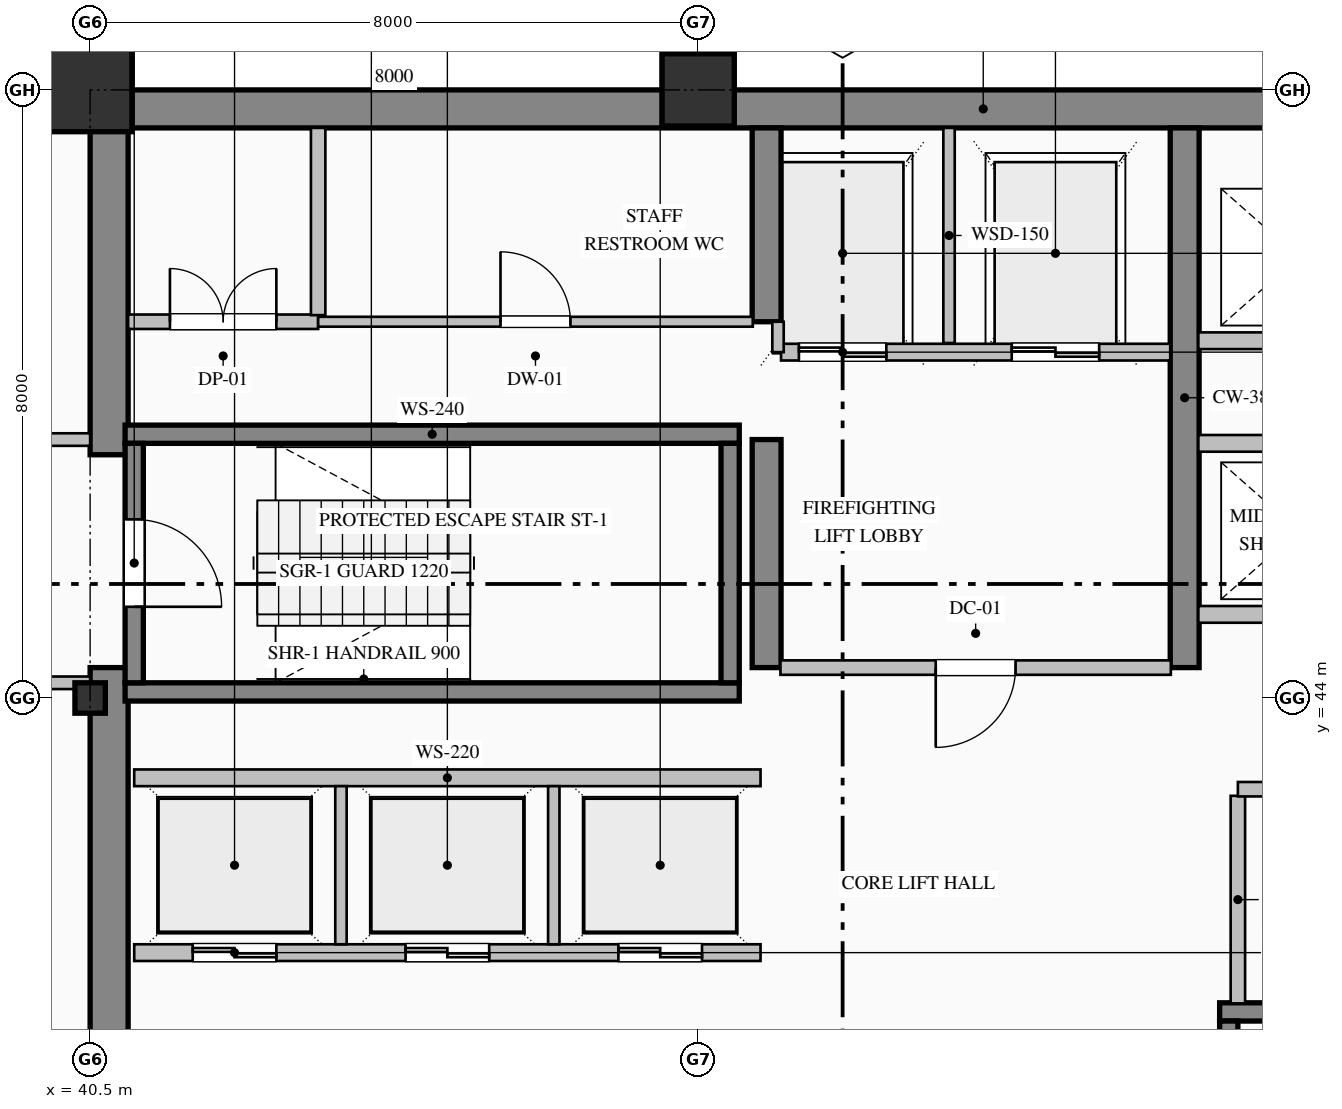
"""IFC4 building model, lengths in metres.
Left out: names, types, materials, properties, quantities, classifications, styles, units other than length and angle.
Written with IfcOpenShell. Run it as: python <this file> out.ifc"""

import sys

from ifc_helpers import new_model, si_unit, direction, frame, frame_2d, origin, origin_2d, place, context, subcontext, project, spatial, rectangle, hollow_rectangle, i_section, extrude, element, fill, save


model = new_model("IFC4")
c1 = context("Model", 3, precision=1e-05, world=origin(), true_north=direction((0.0, 1.0)))
c2 = subcontext(c1, "Body", "Model", "MODEL_VIEW")
j1 = project(units=[si_unit("LENGTHUNIT", "METRE"), si_unit("PLANEANGLEUNIT", "RADIAN")], contexts=[c1])
p1 = place(None, origin())
s1 = spatial("IfcSite", under=j1, at=p1, CompositionType="ELEMENT")
p2 = place(p1, origin())
s2 = spatial("IfcBuilding", under=s1, at=p2, CompositionType="ELEMENT")
p3 = place(p2, frame((0.0, 0.0, 163.0)))
s3 = spatial("IfcBuildingStorey", under=s2, at=p3, CompositionType="ELEMENT", Elevation=163.0)
p4 = place(p3, frame((40.5, 51.75, 0.0), z_axis=(0.0, 0.0, 1.0), x_axis=(1.0, 0.0, 0.0)))
e1 = element("IfcWall", 1, at=p4, inside=s3, PredefinedType="SHEAR", context=c2, shape_type="SweptSolid", body=[
    extrude(rectangle(XDim=23.5, YDim=0.5, at=frame_2d((11.75, 0.0))), origin(), (0.0, 0.0, 1.0), 3.765),
])
p5 = place(p3, frame((40.75, 36.5, 0.0), z_axis=(0.0, 0.0, 1.0), x_axis=(0.0, 1.0, 0.0)))
e2 = element("IfcWall", 2, at=p5, inside=s3, PredefinedType="SHEAR", context=c2, shape_type="SweptSolid", body=[
    extrude(rectangle(XDim=7.9, YDim=0.5, at=frame_2d((3.95, 0.0))), origin(), (0.0, 0.0, 1.0), 3.765),
])
p6 = place(p3, frame((40.75, 47.2, 0.0), z_axis=(0.0, 0.0, 1.0), x_axis=(0.0, 1.0, 0.0)))
e3 = element("IfcWall", 3, at=p6, inside=s3, PredefinedType="SHEAR", context=c2, shape_type="SweptSolid", body=[
    extrude(rectangle(XDim=4.3, YDim=0.5, at=frame_2d((2.15, 0.0))), origin(), (0.0, 0.0, 1.0), 3.765),
])
p7 = place(p3, frame((49.4, 44.4, 0.0), z_axis=(0.0, 0.0, 1.0), x_axis=(0.0, 1.0, 0.0)))
e4 = element("IfcWall", 4, at=p7, inside=s3, PredefinedType="SHEAR", context=c2, shape_type="SweptSolid", body=[
    extrude(rectangle(XDim=3.0, YDim=0.38, at=frame_2d((1.5, 0.0))), origin(), (0.0, 0.0, 1.0), 3.765),
])
p8 = place(p3, frame((49.4, 48.95, 0.0), z_axis=(0.0, 0.0, 1.0), x_axis=(0.0, 1.0, 0.0)))
e5 = element("IfcWall", 5, at=p8, inside=s3, PredefinedType="SHEAR", context=c2, shape_type="SweptSolid", body=[
    extrude(rectangle(XDim=2.55, YDim=0.38, at=frame_2d((1.275, 0.0))), origin(), (0.0, 0.0, 1.0), 3.765),
])
p9 = place(p3, frame((54.9, 44.4, 0.0), z_axis=(0.0, 0.0, 1.0), x_axis=(0.0, 1.0, 0.0)))
e6 = element("IfcWall", 6, at=p9, inside=s3, PredefinedType="SHEAR", context=c2, shape_type="SweptSolid", body=[
    extrude(rectangle(XDim=7.1, YDim=0.38, at=frame_2d((3.55, 0.0))), origin(), (0.0, 0.0, 1.0), 3.765),
])
p10 = place(p3, frame((40.5, 44.0, 0.0), z_axis=(0.0, 0.0, 1.0), x_axis=(1.0, 0.0, 0.0)))
e7 = element("IfcColumn", 7, at=p10, inside=s3, PredefinedType="COLUMN", context=c2, shape_type="SweptSolid", body=[
    extrude(i_section(OverallWidth=0.4, OverallDepth=0.4, WebThickness=0.013, FlangeThickness=0.021, FilletRadius=0.022, at=origin_2d()), origin(), (0.0, 0.0, 1.0), 4.0),
])
p11 = place(p3, frame((40.5, 52.0, 0.0), z_axis=(0.0, 0.0, 1.0), x_axis=(1.0, 0.0, 0.0)))
e8 = element("IfcColumn", 8, at=p11, inside=s3, PredefinedType="COLUMN", context=c2, shape_type="SweptSolid", body=[
    extrude(hollow_rectangle(XDim=1.1, YDim=1.1, WallThickness=0.04, at=origin_2d()), origin(), (0.0, 0.0, 1.0), 4.0),
])
p12 = place(p3, frame((48.5, 52.0, 0.0), z_axis=(0.0, 0.0, 1.0), x_axis=(1.0, 0.0, 0.0)))
e9 = element("IfcColumn", 9, at=p12, inside=s3, PredefinedType="COLUMN", context=c2, shape_type="SweptSolid", body=[
    extrude(hollow_rectangle(XDim=0.95, YDim=0.95, WallThickness=0.036, at=origin_2d()), origin(), (0.0, 0.0, 1.0), 4.0),
])
p13 = place(p3, frame((13.0, 51.82, 0.0), z_axis=(0.0, 0.0, 1.0), x_axis=(1.0, 0.0, 0.0)))
e10 = element("IfcWall", 10, at=p13, inside=s3, PredefinedType="SOLIDWALL", context=c2, shape_type="SweptSolid", body=[
    extrude(rectangle(XDim=27.52, YDim=0.36, at=frame_2d((13.76, 0.0))), origin(), (0.0, 0.0, 1.0), 3.265),
])
p14 = place(p13, frame((6.45, 0.0, 0.85)))
e11 = element("IfcOpeningElement", 11, at=p14, cuts=e10, PredefinedType="OPENING", context=c2, shape_type="SweptSolid", body=[
    extrude(rectangle(XDim=1.5, YDim=1.95, at=frame_2d((0.75, 0.975))), frame((0.0, 0.19, 0.0), z_axis=(0.0, -1.0, 0.0), x_axis=(1.0, 0.0, 0.0)), (0.0, 0.0, 1.0), 0.38),
])
p15 = place(p13, frame((13.8, 0.0, 0.7)))
e12 = element("IfcOpeningElement", 12, at=p15, cuts=e10, PredefinedType="OPENING", context=c2, shape_type="SweptSolid", body=[
    extrude(rectangle(XDim=1.2, YDim=1.85, at=frame_2d((0.6, 0.925))), frame((0.0, 0.19, 0.0), z_axis=(0.0, -1.0, 0.0), x_axis=(1.0, 0.0, 0.0)), (0.0, 0.0, 1.0), 0.38),
])
for number, where, z_axis, x_axis in (
    (13, (40.96, 47.47, 0.0), (0.0, 0.0, 1.0), (1.0, 0.0, 0.0)),
    (14, (49.04, 44.08, 0.0), (0.0, 0.0, 1.0), (-1.0, 0.0, 0.0)),
):
    element("IfcWall", number, at=place(p3, frame(where, z_axis=z_axis, x_axis=x_axis)), inside=s3, PredefinedType="SOLIDWALL", context=c2, shape_type="SweptSolid", body=[
        extrude(rectangle(XDim=8.08, YDim=0.24, at=frame_2d((4.04, 0.0))), origin(), (0.0, 0.0, 1.0), 4.0),
    ])
p16 = place(p3, frame((41.08, 47.35, 0.0), z_axis=(0.0, 0.0, 1.0), x_axis=(0.0, -1.0, 0.0)))
e15 = element("IfcWall", 15, at=p16, inside=s3, PredefinedType="SOLIDWALL", context=c2, shape_type="SweptSolid", body=[
    extrude(rectangle(XDim=3.15, YDim=0.24, at=frame_2d((1.575, 0.0))), origin(), (0.0, 0.0, 1.0), 4.0),
])
p17 = place(p16, frame((1.0, 0.0, 0.0)))
e16 = element("IfcOpeningElement", 16, at=p17, cuts=e15, PredefinedType="OPENING", context=c2, shape_type="SweptSolid", body=[
    extrude(rectangle(XDim=1.15, YDim=2.2, at=frame_2d((0.575, 1.1))), frame((0.0, 0.13, 0.0), z_axis=(0.0, -1.0, 0.0), x_axis=(1.0, 0.0, 0.0)), (0.0, 0.0, 1.0), 0.26),
])
p18 = place(p3, frame((48.92, 44.2, 0.0), z_axis=(0.0, 0.0, 1.0), x_axis=(0.0, 1.0, 0.0)))
e17 = element("IfcWall", 17, at=p18, inside=s3, PredefinedType="SOLIDWALL", context=c2, shape_type="SweptSolid", body=[
    extrude(rectangle(XDim=3.15, YDim=0.24, at=frame_2d((1.575, 0.0))), origin(), (0.0, 0.0, 1.0), 4.0),
])
p19 = place(p3, frame((55.36, 39.87, 0.0), z_axis=(0.0, 0.0, 1.0), x_axis=(1.0, 0.0, 0.0)))
e18 = element("IfcWall", 18, at=p19, inside=s3, PredefinedType="SOLIDWALL", context=c2, shape_type="SweptSolid", body=[
    extrude(rectangle(XDim=8.08, YDim=0.24, at=frame_2d((4.04, 0.0))), origin(), (0.0, 0.0, 1.0), 4.0),
])
p20 = place(p3, frame((55.48, 39.75, 0.0), z_axis=(0.0, 0.0, 1.0), x_axis=(0.0, -1.0, 0.0)))
e19 = element("IfcWall", 19, at=p20, inside=s3, PredefinedType="SOLIDWALL", context=c2, shape_type="SweptSolid", body=[
    extrude(rectangle(XDim=3.15, YDim=0.24, at=frame_2d((1.575, 0.0))), origin(), (0.0, 0.0, 1.0), 4.0),
])
p21 = place(p20, frame((1.0, 0.0, 0.0)))
e20 = element("IfcOpeningElement", 20, at=p21, cuts=e19, PredefinedType="OPENING", context=c2, shape_type="SweptSolid", body=[
    extrude(rectangle(XDim=1.15, YDim=2.2, at=frame_2d((0.575, 1.1))), frame((0.0, 0.13, 0.0), z_axis=(0.0, -1.0, 0.0), x_axis=(1.0, 0.0, 0.0)), (0.0, 0.0, 1.0), 0.26),
])
p22 = place(p3, frame((54.71, 48.55, 0.0), z_axis=(0.0, 0.0, 1.0), x_axis=(-1.0, 0.0, 0.0)))
e21 = element("IfcWall", 21, at=p22, inside=s3, PredefinedType="PARTITIONING", context=c2, shape_type="SweptSolid", body=[
    extrude(rectangle(XDim=5.12, YDim=0.22, at=frame_2d((2.56, 0.0))), origin(), (0.0, 0.0, 1.0), 3.765),
])
p23 = place(p22, frame((3.735, 0.0, 0.0)))
e22 = element("IfcOpeningElement", 22, at=p23, cuts=e21, PredefinedType="OPENING", context=c2, shape_type="SweptSolid", body=[
    extrude(rectangle(XDim=1.15, YDim=2.2, at=frame_2d((0.575, 1.1))), frame((0.0, 0.12, 0.0), z_axis=(0.0, -1.0, 0.0), x_axis=(1.0, 0.0, 0.0)), (0.0, 0.0, 1.0), 0.24),
])
p24 = place(p22, frame((0.935, 0.0, 0.0)))
e23 = element("IfcOpeningElement", 23, at=p24, cuts=e21, PredefinedType="OPENING", context=c2, shape_type="SweptSolid", body=[
    extrude(rectangle(XDim=1.15, YDim=2.2, at=frame_2d((0.575, 1.1))), frame((0.0, 0.12, 0.0), z_axis=(0.0, -1.0, 0.0), x_axis=(1.0, 0.0, 0.0)), (0.0, 0.0, 1.0), 0.24),
])
p25 = place(p3, frame((51.8, 48.67, 0.0), z_axis=(0.0, 0.0, 1.0), x_axis=(0.0, 1.0, 0.0)))
e24 = element("IfcWall", 24, at=p25, inside=s3, PredefinedType="PARTITIONING", context=c2, shape_type="SweptSolid", body=[
    extrude(rectangle(XDim=2.83, YDim=0.15, at=frame_2d((1.415, 0.0))), origin(), (0.0, 0.0, 1.0), 3.765),
])
p26 = place(p3, frame((49.55, 48.55, 0.0), z_axis=(0.0, 0.0, 1.0), x_axis=(0.0, 1.0, 0.0)))
e25 = element("IfcWall", 25, at=p26, inside=s3, PredefinedType="PARTITIONING", context=c2, shape_type="SweptSolid", body=[
    extrude(rectangle(XDim=0.4, YDim=0.15, at=frame_2d((0.2, 0.0))), origin(), (0.0, 0.0, 1.0), 3.765),
])
p27 = place(p3, frame((49.32, 40.65, 0.0), z_axis=(0.0, 0.0, 1.0), x_axis=(-1.0, 0.0, 0.0)))
e26 = element("IfcWall", 26, at=p27, inside=s3, PredefinedType="PARTITIONING", context=c2, shape_type="SweptSolid", body=[
    extrude(rectangle(XDim=8.24, YDim=0.22, at=frame_2d((4.12, 0.0))), origin(), (0.0, 0.0, 1.0), 3.765),
])
p28 = place(p27, frame((6.37, 0.0, 0.0)))
e27 = element("IfcOpeningElement", 27, at=p28, cuts=e26, PredefinedType="OPENING", context=c2, shape_type="SweptSolid", body=[
    extrude(rectangle(XDim=1.1, YDim=2.2, at=frame_2d((0.55, 1.1))), frame((0.0, 0.12, 0.0), z_axis=(0.0, -1.0, 0.0), x_axis=(1.0, 0.0, 0.0)), (0.0, 0.0, 1.0), 0.24),
])
p29 = place(p27, frame((3.57, 0.0, 0.0)))
e28 = element("IfcOpeningElement", 28, at=p29, cuts=e26, PredefinedType="OPENING", context=c2, shape_type="SweptSolid", body=[
    extrude(rectangle(XDim=1.1, YDim=2.2, at=frame_2d((0.55, 1.1))), frame((0.0, 0.12, 0.0), z_axis=(0.0, -1.0, 0.0), x_axis=(1.0, 0.0, 0.0)), (0.0, 0.0, 1.0), 0.24),
])
p30 = place(p27, frame((0.77, 0.0, 0.0)))
e29 = element("IfcOpeningElement", 29, at=p30, cuts=e26, PredefinedType="OPENING", context=c2, shape_type="SweptSolid", body=[
    extrude(rectangle(XDim=1.1, YDim=2.2, at=frame_2d((0.55, 1.1))), frame((0.0, 0.12, 0.0), z_axis=(0.0, -1.0, 0.0), x_axis=(1.0, 0.0, 0.0)), (0.0, 0.0, 1.0), 0.24),
])
p31 = place(p3, frame((41.08, 42.95, 0.0), z_axis=(0.0, 0.0, 1.0), x_axis=(1.0, 0.0, 0.0)))
e30 = element("IfcWall", 30, at=p31, inside=s3, PredefinedType="PARTITIONING", context=c2, shape_type="SweptSolid", body=[
    extrude(rectangle(XDim=8.24, YDim=0.22, at=frame_2d((4.12, 0.0))), origin(), (0.0, 0.0, 1.0), 3.765),
])
for number, where, z_axis, x_axis in (
    (31, (43.8, 40.76, 0.0), (0.0, 0.0, 1.0), (0.0, 1.0, 0.0)),
    (32, (46.6, 40.76, 0.0), (0.0, 0.0, 1.0), (0.0, 1.0, 0.0)),
):
    element("IfcWall", number, at=place(p3, frame(where, z_axis=z_axis, x_axis=x_axis)), inside=s3, PredefinedType="PARTITIONING", context=c2, shape_type="SweptSolid", body=[
        extrude(rectangle(XDim=2.08, YDim=0.15, at=frame_2d((1.04, 0.0))), origin(), (0.0, 0.0, 1.0), 3.765),
    ])
for number, where, z_axis, x_axis in (
    (33, (63.32, 45.1, 0.0), (0.0, 0.0, 1.0), (-1.0, 0.0, 0.0)),
    (34, (55.08, 47.35, 0.0), (0.0, 0.0, 1.0), (1.0, 0.0, 0.0)),
    (35, (63.32, 48.7, 0.0), (0.0, 0.0, 1.0), (-1.0, 0.0, 0.0)),
):
    element("IfcWall", number, at=place(p3, frame(where, z_axis=z_axis, x_axis=x_axis)), inside=s3, PredefinedType="PARTITIONING", context=c2, shape_type="SweptSolid", body=[
        extrude(rectangle(XDim=8.24, YDim=0.22, at=frame_2d((4.12, 0.0))), origin(), (0.0, 0.0, 1.0), 3.765),
    ])
p32 = place(p3, frame((37.8, 47.4, 0.0), z_axis=(0.0, 0.0, 1.0), x_axis=(1.0, 0.0, 0.0)))
e36 = element("IfcWall", 36, at=p32, inside=s3, PredefinedType="PARTITIONING", context=c2, shape_type="SweptSolid", body=[
    extrude(rectangle(XDim=2.7, YDim=0.165, at=frame_2d((1.35, 0.0))), origin(), (0.0, 0.0, 1.0), 3.765),
])
p33 = place(p32, frame((0.825, 0.0, 0.0)))
e37 = element("IfcOpeningElement", 37, at=p33, cuts=e36, PredefinedType="OPENING", context=c2, shape_type="SweptSolid", body=[
    extrude(rectangle(XDim=1.05, YDim=2.15, at=frame_2d((0.525, 1.075))), frame((0.0, 0.093, 0.0), z_axis=(0.0, -1.0, 0.0), x_axis=(1.0, 0.0, 0.0)), (0.0, 0.0, 1.0), 0.185),
])
p34 = place(p3, frame((40.5, 44.2, 0.0), z_axis=(0.0, 0.0, 1.0), x_axis=(-1.0, 0.0, 0.0)))
e38 = element("IfcWall", 38, at=p34, inside=s3, PredefinedType="PARTITIONING", context=c2, shape_type="SweptSolid", body=[
    extrude(rectangle(XDim=2.7, YDim=0.165, at=frame_2d((1.35, 0.0))), origin(), (0.0, 0.0, 1.0), 3.765),
])
p35 = place(p34, frame((0.825, 0.0, 0.0)))
e39 = element("IfcOpeningElement", 39, at=p35, cuts=e38, PredefinedType="OPENING", context=c2, shape_type="SweptSolid", body=[
    extrude(rectangle(XDim=1.05, YDim=2.15, at=frame_2d((0.525, 1.075))), frame((0.0, 0.093, 0.0), z_axis=(0.0, -1.0, 0.0), x_axis=(1.0, 0.0, 0.0)), (0.0, 0.0, 1.0), 0.185),
])
p36 = place(p3, frame((41.0, 48.95, 0.0), z_axis=(0.0, 0.0, 1.0), x_axis=(1.0, 0.0, 0.0)))
e40 = element("IfcWall", 40, at=p36, inside=s3, PredefinedType="PARTITIONING", context=c2, shape_type="SweptSolid", body=[
    extrude(rectangle(XDim=2.5, YDim=0.19, at=frame_2d((1.25, 0.0))), origin(), (0.0, 0.0, 1.0), 3.765),
])
p37 = place(p36, frame((0.55, 0.0, 0.0)))
e41 = element("IfcOpeningElement", 41, at=p37, cuts=e40, PredefinedType="OPENING", context=c2, shape_type="SweptSolid", body=[
    extrude(rectangle(XDim=1.4, YDim=2.25, at=frame_2d((0.7, 1.125))), frame((0.0, 0.105, 0.0), z_axis=(0.0, -1.0, 0.0), x_axis=(1.0, 0.0, 0.0)), (0.0, 0.0, 1.0), 0.21),
])
p38 = place(p3, frame((43.5, 48.95, 0.0), z_axis=(0.0, 0.0, 1.0), x_axis=(1.0, 0.0, 0.0)))
e42 = element("IfcWall", 42, at=p38, inside=s3, PredefinedType="PARTITIONING", context=c2, shape_type="SweptSolid", body=[
    extrude(rectangle(XDim=5.718, YDim=0.13, at=frame_2d((2.859, 0.0))), origin(), (0.0, 0.0, 1.0), 3.765),
])
p39 = place(p38, frame((2.399, 0.0, 0.0)))
e43 = element("IfcOpeningElement", 43, at=p39, cuts=e42, PredefinedType="OPENING", context=c2, shape_type="SweptSolid", body=[
    extrude(rectangle(XDim=0.92, YDim=2.15, at=frame_2d((0.46, 1.075))), frame((0.0, 0.075, 0.0), z_axis=(0.0, -1.0, 0.0), x_axis=(1.0, 0.0, 0.0)), (0.0, 0.0, 1.0), 0.15),
])
p40 = place(p3, frame((54.718, 44.4, 0.0), z_axis=(0.0, 0.0, 1.0), x_axis=(-1.0, 0.0, 0.0)))
e44 = element("IfcWall", 44, at=p40, inside=s3, PredefinedType="PARTITIONING", context=c2, shape_type="SweptSolid", body=[
    extrude(rectangle(XDim=5.136, YDim=0.19, at=frame_2d((2.568, 0.0))), origin(), (0.0, 0.0, 1.0), 3.765),
])
p41 = place(p40, frame((2.043, 0.0, 0.0)))
e45 = element("IfcOpeningElement", 45, at=p41, cuts=e44, PredefinedType="OPENING", context=c2, shape_type="SweptSolid", body=[
    extrude(rectangle(XDim=1.05, YDim=2.15, at=frame_2d((0.525, 1.075))), frame((0.0, 0.105, 0.0), z_axis=(0.0, -1.0, 0.0), x_axis=(1.0, 0.0, 0.0)), (0.0, 0.0, 1.0), 0.21),
])
p42 = place(p3, frame((55.6, 42.713, 0.0), z_axis=(0.0, 0.0, 1.0), x_axis=(0.0, -1.0, 0.0)))
e46 = element("IfcWall", 46, at=p42, inside=s3, PredefinedType="PARTITIONING", context=c2, shape_type="SweptSolid", body=[
    extrude(rectangle(XDim=2.731, YDim=0.19, at=frame_2d((1.365, 0.0))), origin(), (0.0, 0.0, 1.0), 3.765),
])
p43 = place(p3, frame((60.6, 42.8, 0.0), z_axis=(0.0, 0.0, 1.0), x_axis=(-1.0, 0.0, 0.0)))
e47 = element("IfcWall", 47, at=p43, inside=s3, PredefinedType="PARTITIONING", context=c2, shape_type="SweptSolid", body=[
    extrude(rectangle(XDim=5.0, YDim=0.19, at=frame_2d((2.5, 0.0))), origin(), (0.0, 0.0, 1.0), 3.765),
])
p44 = place(p43, frame((1.8, 0.0, 0.0)))
e48 = element("IfcOpeningElement", 48, at=p44, cuts=e47, PredefinedType="OPENING", context=c2, shape_type="SweptSolid", body=[
    extrude(rectangle(XDim=1.4, YDim=2.25, at=frame_2d((0.7, 1.125))), frame((0.0, 0.105, 0.0), z_axis=(0.0, -1.0, 0.0), x_axis=(1.0, 0.0, 0.0)), (0.0, 0.0, 1.0), 0.21),
])
p45 = place(p3, frame((43.5, 51.5, 0.0), z_axis=(0.0, 0.0, 1.0), x_axis=(0.0, -1.0, 0.0)))
e49 = element("IfcWall", 49, at=p45, inside=s3, PredefinedType="PARTITIONING", context=c2, shape_type="SweptSolid", body=[
    extrude(rectangle(XDim=2.463, YDim=0.19, at=frame_2d((1.231, 0.0))), origin(), (0.0, 0.0, 1.0), 3.765),
])
p46 = place(p17, origin())
e50 = element("IfcDoor", 50, at=p46, inside=s3, OperationType="SINGLE_SWING_RIGHT", PredefinedType="DOOR", context=c2, shape_type="SweptSolid", body=[
    extrude(rectangle(XDim=1.15, YDim=2.2, at=frame_2d((0.575, 1.1))), frame((0.0, 0.025, 0.0), z_axis=(0.0, -1.0, 0.0), x_axis=(1.0, 0.0, 0.0)), (0.0, 0.0, 1.0), 0.05),
])
fill(e16, e50)
p47 = place(p23, origin())
e51 = element("IfcDoor", 51, at=p47, inside=s3, OperationType="DOUBLE_DOOR_SLIDING", PredefinedType="DOOR", context=c2, shape_type="SweptSolid", body=[
    extrude(rectangle(XDim=1.15, YDim=2.2, at=frame_2d((0.575, 1.1))), frame((0.0, 0.025, 0.0), z_axis=(0.0, -1.0, 0.0), x_axis=(1.0, 0.0, 0.0)), (0.0, 0.0, 1.0), 0.05),
])
fill(e22, e51)
p48 = place(p24, origin())
e52 = element("IfcDoor", 52, at=p48, inside=s3, OperationType="DOUBLE_DOOR_SLIDING", PredefinedType="DOOR", context=c2, shape_type="SweptSolid", body=[
    extrude(rectangle(XDim=1.15, YDim=2.2, at=frame_2d((0.575, 1.1))), frame((0.0, 0.025, 0.0), z_axis=(0.0, -1.0, 0.0), x_axis=(1.0, 0.0, 0.0)), (0.0, 0.0, 1.0), 0.05),
])
fill(e23, e52)
p49 = place(p28, origin())
e53 = element("IfcDoor", 53, at=p49, inside=s3, OperationType="DOUBLE_DOOR_SLIDING", PredefinedType="DOOR", context=c2, shape_type="SweptSolid", body=[
    extrude(rectangle(XDim=1.1, YDim=2.2, at=frame_2d((0.55, 1.1))), frame((0.0, 0.025, 0.0), z_axis=(0.0, -1.0, 0.0), x_axis=(1.0, 0.0, 0.0)), (0.0, 0.0, 1.0), 0.05),
])
fill(e27, e53)
p50 = place(p29, origin())
e54 = element("IfcDoor", 54, at=p50, inside=s3, OperationType="DOUBLE_DOOR_SLIDING", PredefinedType="DOOR", context=c2, shape_type="SweptSolid", body=[
    extrude(rectangle(XDim=1.1, YDim=2.2, at=frame_2d((0.55, 1.1))), frame((0.0, 0.025, 0.0), z_axis=(0.0, -1.0, 0.0), x_axis=(1.0, 0.0, 0.0)), (0.0, 0.0, 1.0), 0.05),
])
fill(e28, e54)
p51 = place(p30, origin())
e55 = element("IfcDoor", 55, at=p51, inside=s3, OperationType="DOUBLE_DOOR_SLIDING", PredefinedType="DOOR", context=c2, shape_type="SweptSolid", body=[
    extrude(rectangle(XDim=1.1, YDim=2.2, at=frame_2d((0.55, 1.1))), frame((0.0, 0.025, 0.0), z_axis=(0.0, -1.0, 0.0), x_axis=(1.0, 0.0, 0.0)), (0.0, 0.0, 1.0), 0.05),
])
fill(e29, e55)
p52 = place(p41, origin())
e56 = element("IfcDoor", 56, at=p52, inside=s3, OperationType="SINGLE_SWING_RIGHT", PredefinedType="DOOR", context=c2, shape_type="SweptSolid", body=[
    extrude(rectangle(XDim=1.05, YDim=2.15, at=frame_2d((0.525, 1.075))), frame((0.0, 0.025, 0.0), z_axis=(0.0, -1.0, 0.0), x_axis=(1.0, 0.0, 0.0)), (0.0, 0.0, 1.0), 0.05),
])
fill(e45, e56)
p53 = place(p37, origin())
e57 = element("IfcDoor", 57, at=p53, inside=s3, OperationType="DOUBLE_DOOR_SINGLE_SWING", PredefinedType="DOOR", context=c2, shape_type="SweptSolid", body=[
    extrude(rectangle(XDim=1.4, YDim=2.25, at=frame_2d((0.7, 1.125))), frame((0.0, 0.025, 0.0), z_axis=(0.0, -1.0, 0.0), x_axis=(1.0, 0.0, 0.0)), (0.0, 0.0, 1.0), 0.05),
])
fill(e41, e57)
p54 = place(p39, origin())
e58 = element("IfcDoor", 58, at=p54, inside=s3, OperationType="SINGLE_SWING_LEFT", PredefinedType="DOOR", context=c2, shape_type="SweptSolid", body=[
    extrude(rectangle(XDim=0.92, YDim=2.15, at=frame_2d((0.46, 1.075))), frame((0.0, 0.025, 0.0), z_axis=(0.0, -1.0, 0.0), x_axis=(1.0, 0.0, 0.0)), (0.0, 0.0, 1.0), 0.05),
])
fill(e43, e58)
save(model, sys.argv[1])
